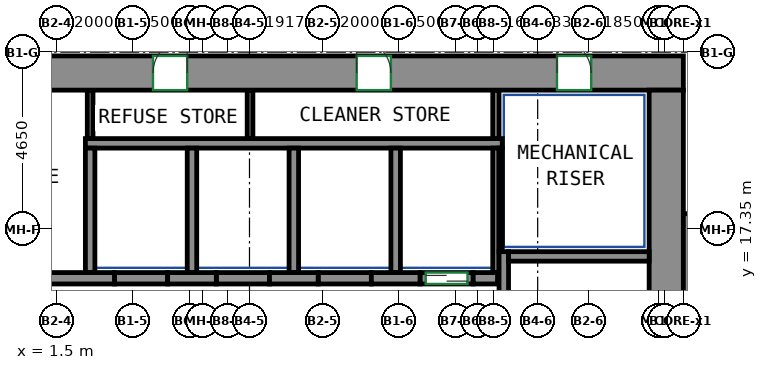
"""IFC4 building model, lengths in metres.
Left out: names, types, materials, properties, quantities, classifications, styles, units other than length and angle.
Written with IfcOpenShell. Run it as: python <this file> out.ifc"""

import sys

from ifc_helpers import new_model, si_unit, direction, frame, frame_2d, origin, place, context, subcontext, project, spatial, rectangle, extrude, source, transform, mapped, element, fill, save


model = new_model("IFC4")
c1 = context("Model", 3, precision=1e-05, world=origin(), true_north=direction((0.0, 1.0)))
c2 = subcontext(c1, "Body", "Model", "MODEL_VIEW")
j1 = project(units=[si_unit("LENGTHUNIT", "METRE"), si_unit("PLANEANGLEUNIT", "RADIAN")], contexts=[c1])
p1 = place(None, origin())
s1 = spatial("IfcSite", under=j1, at=p1, CompositionType="ELEMENT")
p2 = place(p1, origin())
s2 = spatial("IfcBuilding", under=s1, at=p2, CompositionType="ELEMENT")
p3 = place(p2, frame((0.0, 0.0, 157.5)))
s3 = spatial("IfcBuildingStorey", under=s2, at=p3, CompositionType="ELEMENT", Elevation=157.5)
m1 = source(origin(), c2, "Body", "SweptSolid", [
    extrude(rectangle(XDim=33.9, YDim=0.9, at=frame_2d((16.95, 0.0))), origin(), (0.0, 0.0, 1.0), 3.12),
])
p4 = place(p3, frame((-15.9, 21.45, 0.0), z_axis=(0.0, 0.0, 1.0), x_axis=(1.0, 0.0, 0.0)))
e1 = element("IfcWall", 1, at=p4, inside=s3, PredefinedType="SHEAR", context=c2, shape_type="MappedRepresentation", body=[
    mapped(m1, transform((0.0, 0.0, 0.0))),
])
p5 = place(p4, frame((8.42, 0.0, 0.0)))
e2 = element("IfcOpeningElement", 2, at=p5, cuts=e1, PredefinedType="OPENING", context=c2, shape_type="SweptSolid", body=[
    extrude(rectangle(XDim=0.9, YDim=2.1, at=frame_2d((0.45, 1.05))), frame((0.0, 0.46, 0.0), z_axis=(0.0, -1.0, 0.0), x_axis=(1.0, 0.0, 0.0)), (0.0, 0.0, 1.0), 0.92),
])
p6 = place(p4, frame((15.12, 0.0, 0.0)))
e3 = element("IfcOpeningElement", 3, at=p6, cuts=e1, PredefinedType="OPENING", context=c2, shape_type="SweptSolid", body=[
    extrude(rectangle(XDim=0.9, YDim=2.1, at=frame_2d((0.45, 1.05))), frame((0.0, 0.46, 0.0), z_axis=(0.0, -1.0, 0.0), x_axis=(1.0, 0.0, 0.0)), (0.0, 0.0, 1.0), 0.92),
])
p7 = place(p4, frame((19.944, 0.0, 0.0)))
e4 = element("IfcOpeningElement", 4, at=p7, cuts=e1, PredefinedType="OPENING", context=c2, shape_type="SweptSolid", body=[
    extrude(rectangle(XDim=0.9, YDim=2.1, at=frame_2d((0.45, 1.05))), frame((0.0, 0.46, 0.0), z_axis=(0.0, -1.0, 0.0), x_axis=(1.0, 0.0, 0.0)), (0.0, 0.0, 1.0), 0.92),
])
p8 = place(p4, frame((25.304, 0.0, 0.0)))
e5 = element("IfcOpeningElement", 5, at=p8, cuts=e1, PredefinedType="OPENING", context=c2, shape_type="SweptSolid", body=[
    extrude(rectangle(XDim=0.9, YDim=2.1, at=frame_2d((0.45, 1.05))), frame((0.0, 0.46, 0.0), z_axis=(0.0, -1.0, 0.0), x_axis=(1.0, 0.0, 0.0)), (0.0, 0.0, 1.0), 0.92),
])
p9 = place(p4, frame((2.425, 0.0, 0.0)))
e6 = element("IfcOpeningElement", 6, at=p9, cuts=e1, PredefinedType="OPENING", context=c2, shape_type="SweptSolid", body=[
    extrude(rectangle(XDim=0.9, YDim=2.1, at=frame_2d((0.45, 1.05))), frame((0.0, 0.46, 0.0), z_axis=(0.0, -1.0, 0.0), x_axis=(1.0, 0.0, 0.0)), (0.0, 0.0, 1.0), 0.92),
])
p10 = place(p4, frame((30.575, 0.0, 0.0)))
e7 = element("IfcOpeningElement", 7, at=p10, cuts=e1, PredefinedType="OPENING", context=c2, shape_type="SweptSolid", body=[
    extrude(rectangle(XDim=0.9, YDim=2.1, at=frame_2d((0.45, 1.05))), frame((0.0, 0.46, 0.0), z_axis=(0.0, -1.0, 0.0), x_axis=(1.0, 0.0, 0.0)), (0.0, 0.0, 1.0), 0.92),
])
m2 = source(origin(), c2, "Body", "SweptSolid", [
    extrude(rectangle(XDim=12.0, YDim=0.9, at=frame_2d((6.0, 0.0))), origin(), (0.0, 0.0, 1.0), 3.12),
])
p11 = place(p3, frame((17.55, 9.0, 0.0), z_axis=(0.0, 0.0, 1.0), x_axis=(0.0, 1.0, 0.0)))
e8 = element("IfcWall", 8, at=p11, inside=s3, PredefinedType="SHEAR", context=c2, shape_type="MappedRepresentation", body=[
    mapped(m2, transform((0.0, 0.0, 0.0))),
])
m3 = source(origin(), c2, "Body", "SweptSolid", [
    extrude(rectangle(XDim=7.75, YDim=0.25, at=frame_2d((3.875, 0.0))), origin(), (0.0, 0.0, 1.0), 3.12),
])
p12 = place(p3, frame((13.275, 9.0, 0.0), z_axis=(0.0, 0.0, 1.0), x_axis=(0.0, 1.0, 0.0)))
e9 = element("IfcWall", 9, at=p12, inside=s3, PredefinedType="SHEAR", context=c2, shape_type="MappedRepresentation", body=[
    mapped(m3, transform((0.0, 0.0, 0.0))),
])
m4 = source(origin(), c2, "Body", "SweptSolid", [
    extrude(rectangle(XDim=3.7, YDim=0.25, at=frame_2d((1.85, 0.0))), origin(), (0.0, 0.0, 1.0), 3.12),
])
p13 = place(p3, frame((13.4, 16.625, 0.0), z_axis=(0.0, 0.0, 1.0), x_axis=(1.0, 0.0, 0.0)))
e10 = element("IfcWall", 10, at=p13, inside=s3, PredefinedType="SHEAR", context=c2, shape_type="MappedRepresentation", body=[
    mapped(m4, transform((0.0, 0.0, 0.0))),
])
m5 = source(origin(), c2, "Body", "SweptSolid", [
    extrude(rectangle(XDim=8.0, YDim=0.35, at=frame_2d((4.0, 0.0))), origin(), (0.0, 0.0, 1.0), 3.12),
])
p14 = place(p3, frame((18.175, 9.75, 0.0), z_axis=(0.0, 0.0, 1.0), x_axis=(0.0, 1.0, 0.0)))
e11 = element("IfcWall", 11, at=p14, inside=s3, PredefinedType="SHEAR", context=c2, shape_type="MappedRepresentation", body=[
    mapped(m5, transform((0.0, 0.0, 0.0))),
])
m6 = source(origin(), c2, "Body", "SweptSolid", [
    extrude(rectangle(XDim=14.04, YDim=0.3, at=frame_2d((7.02, 0.0))), origin(), (0.0, 0.0, 1.0), 3.12),
])
p15 = place(p3, frame((-11.01, 16.05, 0.0), z_axis=(0.0, 0.0, 1.0), x_axis=(1.0, 0.0, 0.0)))
e12 = element("IfcWall", 12, at=p15, inside=s3, PredefinedType="SHEAR", context=c2, shape_type="MappedRepresentation", body=[
    mapped(m6, transform((0.0, 0.0, 0.0))),
])
m7 = source(origin(), c2, "Body", "SweptSolid", [
    extrude(rectangle(XDim=1.28, YDim=0.3, at=frame_2d((0.64, 0.0))), origin(), (0.0, 0.0, 1.0), 3.12),
])
p16 = place(p3, frame((4.43, 16.05, 0.0), z_axis=(0.0, 0.0, 1.0), x_axis=(1.0, 0.0, 0.0)))
e13 = element("IfcWall", 13, at=p16, inside=s3, PredefinedType="SHEAR", context=c2, shape_type="MappedRepresentation", body=[
    mapped(m7, transform((0.0, 0.0, 0.0))),
])
m8 = source(origin(), c2, "Body", "SweptSolid", [
    extrude(rectangle(XDim=1.28, YDim=0.3, at=frame_2d((0.64, 0.0))), origin(), (0.0, 0.0, 1.0), 3.12),
])
p17 = place(p3, frame((7.11, 16.05, 0.0), z_axis=(0.0, 0.0, 1.0), x_axis=(1.0, 0.0, 0.0)))
e14 = element("IfcWall", 14, at=p17, inside=s3, PredefinedType="SHEAR", context=c2, shape_type="MappedRepresentation", body=[
    mapped(m8, transform((0.0, 0.0, 0.0))),
])
p18 = place(p3, frame((9.79, 16.05, 0.0), z_axis=(0.0, 0.0, 1.0), x_axis=(1.0, 0.0, 0.0)))
e15 = element("IfcWall", 15, at=p18, inside=s3, PredefinedType="SHEAR", context=c2, shape_type="MappedRepresentation", body=[
    mapped(m7, transform((0.0, 0.0, 0.0))),
])
m9 = source(origin(), c2, "Body", "SweptSolid", [
    extrude(rectangle(XDim=0.64, YDim=0.3, at=frame_2d((0.32, 0.0))), origin(), (0.0, 0.0, 1.0), 3.12),
])
p19 = place(p3, frame((12.47, 16.05, 0.0), z_axis=(0.0, 0.0, 1.0), x_axis=(1.0, 0.0, 0.0)))
e16 = element("IfcWall", 16, at=p19, inside=s3, PredefinedType="SHEAR", context=c2, shape_type="MappedRepresentation", body=[
    mapped(m9, transform((0.0, 0.0, 0.0))),
])
m10 = source(origin(), c2, "Body", "SweptSolid", [
    extrude(rectangle(XDim=1.4, YDim=0.3, at=frame_2d((0.7, 0.0))), origin(), (0.0, 0.0, 1.0), 3.12),
])
p20 = place(p3, frame((11.07, 16.05, 0.0), z_axis=(0.0, 0.0, 1.0), x_axis=(1.0, 0.0, 0.0)))
e17 = element("IfcWall", 17, at=p20, inside=s3, PredefinedType="PARTITIONING", context=c2, shape_type="MappedRepresentation", body=[
    mapped(m10, transform((0.0, 0.0, 0.0))),
])
p21 = place(p20, frame((0.15, 0.0, 0.0)))
e18 = element("IfcOpeningElement", 18, at=p21, cuts=e17, PredefinedType="OPENING", context=c2, shape_type="SweptSolid", body=[
    extrude(rectangle(XDim=1.1, YDim=2.1, at=frame_2d((0.55, 1.05))), frame((0.0, 0.16, 0.0), z_axis=(0.0, -1.0, 0.0), x_axis=(1.0, 0.0, 0.0)), (0.0, 0.0, 1.0), 0.32),
])
p22 = place(p3, frame((3.03, 16.05, 0.0), z_axis=(0.0, 0.0, 1.0), x_axis=(1.0, 0.0, 0.0)))
e19 = element("IfcWall", 19, at=p22, inside=s3, PredefinedType="PARTITIONING", context=c2, shape_type="MappedRepresentation", body=[
    mapped(m10, transform((0.0, 0.0, 0.0))),
])
m11 = source(origin(), c2, "Body", "SweptSolid", [
    extrude(rectangle(XDim=1.4, YDim=0.3, at=frame_2d((0.7, 0.0))), origin(), (0.0, 0.0, 1.0), 3.12),
])
for number, where, z_axis, x_axis in (
    (20, (5.71, 16.05, 0.0), (0.0, 0.0, 1.0), (1.0, 0.0, 0.0)),
    (21, (8.39, 16.05, 0.0), (0.0, 0.0, 1.0), (1.0, 0.0, 0.0)),
):
    element("IfcWall", number, at=place(p3, frame(where, z_axis=z_axis, x_axis=x_axis)), inside=s3, PredefinedType="PARTITIONING", context=c2, shape_type="MappedRepresentation", body=[
        mapped(m11, transform((0.0, 0.0, 0.0))),
    ])
m12 = source(origin(), c2, "Body", "SweptSolid", [
    extrude(rectangle(XDim=10.97, YDim=0.25, at=frame_2d((5.485, 0.0))), origin(), (0.0, 0.0, 1.0), 3.12),
])
p23 = place(p3, frame((2.265, 19.6, 0.0), z_axis=(0.0, 0.0, 1.0), x_axis=(1.0, 0.0, 0.0)))
e22 = element("IfcWall", 22, at=p23, inside=s3, PredefinedType="PARTITIONING", context=c2, shape_type="MappedRepresentation", body=[
    mapped(m12, transform((0.0, 0.0, 0.0))),
])
m13 = source(origin(), c2, "Body", "SweptSolid", [
    extrude(rectangle(XDim=3.275, YDim=0.165, at=frame_2d((1.638, 0.0))), origin(), (0.0, 0.0, 1.0), 3.12),
])
p24 = place(p3, frame((13.067, 16.2, 0.0), z_axis=(0.0, 0.0, 1.0), x_axis=(0.0, 1.0, 0.0)))
e23 = element("IfcWall", 23, at=p24, inside=s3, PredefinedType="PARTITIONING", context=c2, shape_type="MappedRepresentation", body=[
    mapped(m13, transform((0.0, 0.0, 0.0))),
])
m14 = source(origin(), c2, "Body", "SweptSolid", [
    extrude(rectangle(XDim=1.275, YDim=0.165, at=frame_2d((0.637, 0.0))), origin(), (0.0, 0.0, 1.0), 3.12),
])
p25 = place(p3, frame((13.067, 19.725, 0.0), z_axis=(0.0, 0.0, 1.0), x_axis=(0.0, 1.0, 0.0)))
e24 = element("IfcWall", 24, at=p25, inside=s3, PredefinedType="PARTITIONING", context=c2, shape_type="MappedRepresentation", body=[
    mapped(m14, transform((0.0, 0.0, 0.0))),
])
m15 = source(origin(), c2, "Body", "SweptSolid", [
    extrude(rectangle(XDim=3.275, YDim=0.25, at=frame_2d((1.638, 0.0))), origin(), (0.0, 0.0, 1.0), 3.12),
])
p26 = place(p3, frame((10.43, 16.2, 0.0), z_axis=(0.0, 0.0, 1.0), x_axis=(0.0, 1.0, 0.0)))
e25 = element("IfcWall", 25, at=p26, inside=s3, PredefinedType="PARTITIONING", context=c2, shape_type="MappedRepresentation", body=[
    mapped(m15, transform((0.0, 0.0, 0.0))),
])
m16 = source(origin(), c2, "Body", "SweptSolid", [
    extrude(rectangle(XDim=2.725, YDim=0.085, at=frame_2d((1.363, 0.0))), origin(), (0.0, 0.0, 1.0), 3.12),
])
p27 = place(p3, frame((13.192, 16.75, 0.0), z_axis=(0.0, 0.0, 1.0), x_axis=(0.0, 1.0, 0.0)))
e26 = element("IfcWall", 26, at=p27, inside=s3, PredefinedType="PARTITIONING", context=c2, shape_type="MappedRepresentation", body=[
    mapped(m16, transform((0.0, 0.0, 0.0))),
])
for number, where, z_axis, x_axis in (
    (27, (2.39, 16.2, 0.0), (0.0, 0.0, 1.0), (0.0, 1.0, 0.0)),
    (28, (5.07, 16.2, 0.0), (0.0, 0.0, 1.0), (0.0, 1.0, 0.0)),
    (29, (7.75, 16.2, 0.0), (0.0, 0.0, 1.0), (0.0, 1.0, 0.0)),
):
    element("IfcWall", number, at=place(p3, frame(where, z_axis=z_axis, x_axis=x_axis)), inside=s3, PredefinedType="PARTITIONING", context=c2, shape_type="MappedRepresentation", body=[
        mapped(m15, transform((0.0, 0.0, 0.0))),
    ])
m17 = source(origin(), c2, "Body", "SweptSolid", [
    extrude(rectangle(XDim=1.275, YDim=0.15, at=frame_2d((0.637, 0.0))), origin(), (0.0, 0.0, 1.0), 3.12),
])
for number, where, z_axis, x_axis in (
    (30, (2.39, 19.725, 0.0), (0.0, 0.0, 1.0), (0.0, 1.0, 0.0)),
    (31, (6.598, 19.725, 0.0), (0.0, 0.0, 1.0), (0.0, 1.0, 0.0)),
):
    element("IfcWall", number, at=place(p3, frame(where, z_axis=z_axis, x_axis=x_axis)), inside=s3, PredefinedType="PARTITIONING", context=c2, shape_type="MappedRepresentation", body=[
        mapped(m17, transform((0.0, 0.0, 0.0))),
    ])
p28 = place(p21, origin())
e32 = element("IfcDoor", 32, at=p28, inside=s3, OperationType="DOUBLE_DOOR_SLIDING", PredefinedType="DOOR", context=c2, shape_type="SweptSolid", body=[
    extrude(rectangle(XDim=1.1, YDim=2.1, at=frame_2d((0.55, 1.05))), frame((0.0, 0.025, 0.0), z_axis=(0.0, -1.0, 0.0), x_axis=(1.0, 0.0, 0.0)), (0.0, 0.0, 1.0), 0.05),
])
fill(e18, e32)
p29 = place(p7, origin())
e33 = element("IfcDoor", 33, at=p29, inside=s3, OperationType="SINGLE_SWING_RIGHT", PredefinedType="DOOR", context=c2, shape_type="SweptSolid", body=[
    extrude(rectangle(XDim=0.9, YDim=2.1, at=frame_2d((0.45, 1.05))), frame((0.0, -0.305, 0.0), z_axis=(0.0, -1.0, 0.0), x_axis=(1.0, 0.0, 0.0)), (0.0, 0.0, 1.0), 0.05),
])
fill(e4, e33)
p30 = place(p8, origin())
e34 = element("IfcDoor", 34, at=p30, inside=s3, OperationType="SINGLE_SWING_LEFT", PredefinedType="DOOR", context=c2, shape_type="SweptSolid", body=[
    extrude(rectangle(XDim=0.9, YDim=2.1, at=frame_2d((0.45, 1.05))), frame((0.0, -0.305, 0.0), z_axis=(0.0, -1.0, 0.0), x_axis=(1.0, 0.0, 0.0)), (0.0, 0.0, 1.0), 0.05),
])
fill(e5, e34)
p31 = place(p10, origin())
e35 = element("IfcDoor", 35, at=p31, inside=s3, OperationType="SINGLE_SWING_LEFT", PredefinedType="DOOR", context=c2, shape_type="SweptSolid", body=[
    extrude(rectangle(XDim=0.9, YDim=2.1, at=frame_2d((0.45, 1.05))), frame((0.0, -0.305, 0.0), z_axis=(0.0, -1.0, 0.0), x_axis=(1.0, 0.0, 0.0)), (0.0, 0.0, 1.0), 0.05),
])
fill(e7, e35)
save(model, sys.argv[1])
